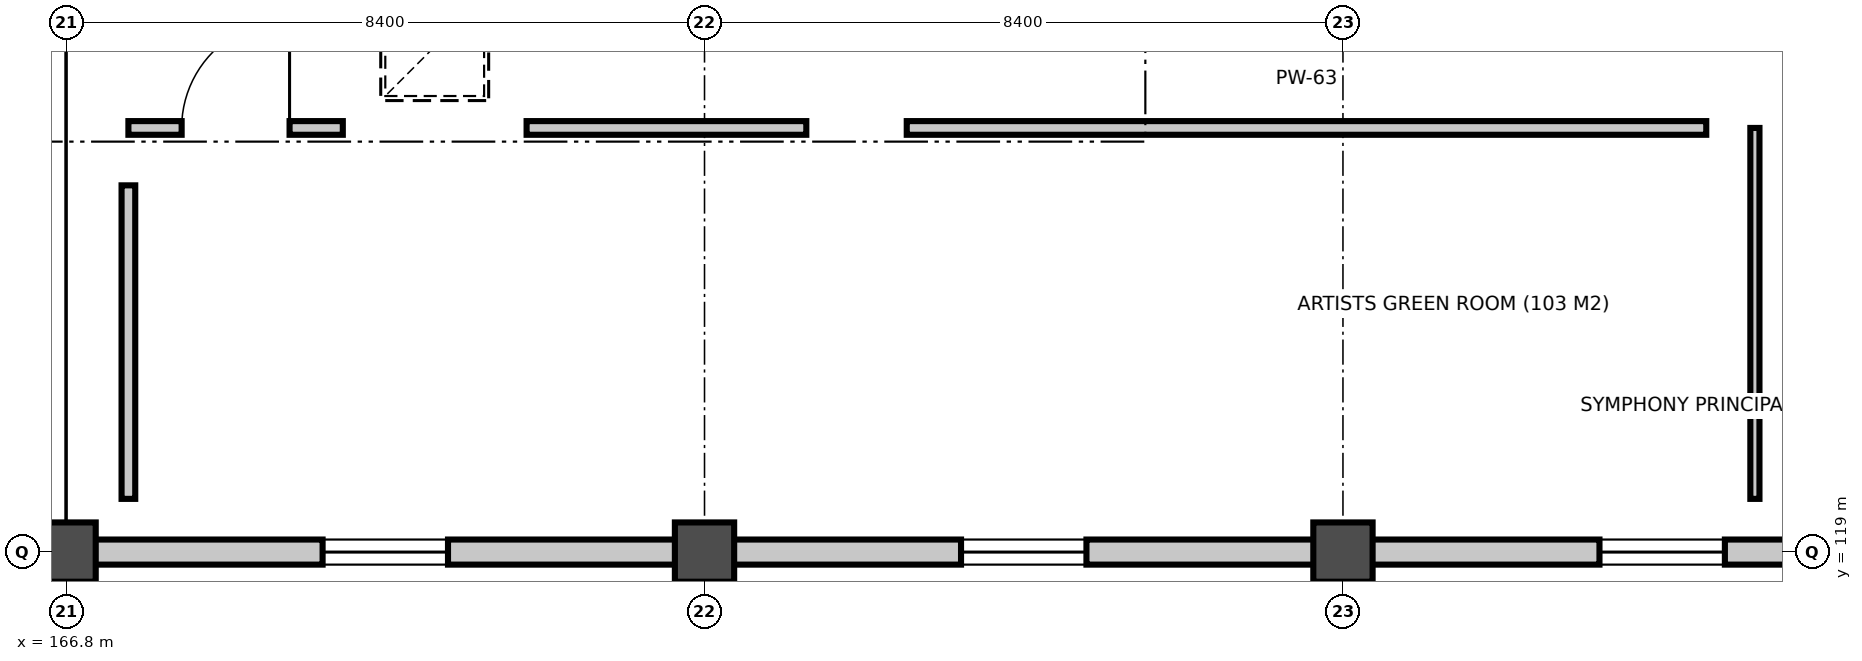
"""IFC4 building model, lengths in metres.
Left out: names, types, materials, properties, quantities, classifications, styles, units other than length and angle.
Written with IfcOpenShell. Run it as: python <this file> out.ifc"""

import sys

from ifc_helpers import new_model, si_unit, direction, frame, frame_2d, origin, origin_2d, place, context, subcontext, project, spatial, rectangle, extrude, element, fill, save


model = new_model("IFC4")
c1 = context("Model", 3, precision=1e-05, world=origin(), true_north=direction((0.0, 1.0)))
c2 = subcontext(c1, "Body", "Model", "MODEL_VIEW")
j1 = project(units=[si_unit("LENGTHUNIT", "METRE"), si_unit("PLANEANGLEUNIT", "RADIAN")], contexts=[c1])
p1 = place(None, origin())
s1 = spatial("IfcSite", under=j1, at=p1, CompositionType="ELEMENT")
p2 = place(p1, origin())
s2 = spatial("IfcBuilding", under=s1, at=p2, CompositionType="ELEMENT")
p3 = place(p2, frame((0.0, 0.0, 5.4)))
s3 = spatial("IfcBuildingStorey", under=s2, at=p3, CompositionType="ELEMENT", Elevation=5.4)
for number, where, z_axis, x_axis in (
    (1, (166.8, 119.0, 0.0), (0.0, 0.0, 1.0), (1.0, 0.0, 0.0)),
    (2, (175.2, 119.0, 0.0), (0.0, 0.0, 1.0), (1.0, 0.0, 0.0)),
    (3, (183.6, 119.0, 0.0), (0.0, 0.0, 1.0), (1.0, 0.0, 0.0)),
):
    element("IfcColumn", number, at=place(p3, frame(where, z_axis=z_axis, x_axis=x_axis)), inside=s3, PredefinedType="COLUMN", context=c2, shape_type="SweptSolid", body=[
        extrude(rectangle(XDim=0.78, YDim=0.78, at=origin_2d()), origin(), (0.0, 0.0, 1.0), 4.8),
    ])
p4 = place(p3, frame((174.83, 119.0, 0.0), z_axis=(0.0, 0.0, 1.0), x_axis=(-1.0, 0.0, 0.0)))
e4 = element("IfcWall", 4, at=p4, inside=s3, PredefinedType="SOLIDWALL", context=c2, shape_type="SweptSolid", body=[
    extrude(rectangle(XDim=7.66, YDim=0.33, at=frame_2d((3.83, 0.0))), origin(), (0.0, 0.0, 1.0), 3.488),
])
p5 = place(p4, frame((3.005, 0.0, 0.95)))
e5 = element("IfcOpeningElement", 5, at=p5, cuts=e4, PredefinedType="OPENING", context=c2, shape_type="SweptSolid", body=[
    extrude(rectangle(XDim=1.65, YDim=2.05, at=frame_2d((0.825, 1.025))), frame((0.0, 0.175, 0.0), z_axis=(0.0, -1.0, 0.0), x_axis=(1.0, 0.0, 0.0)), (0.0, 0.0, 1.0), 0.35),
])
p6 = place(p3, frame((183.23, 119.0, 0.0), z_axis=(0.0, 0.0, 1.0), x_axis=(-1.0, 0.0, 0.0)))
e6 = element("IfcWall", 6, at=p6, inside=s3, PredefinedType="SOLIDWALL", context=c2, shape_type="SweptSolid", body=[
    extrude(rectangle(XDim=7.66, YDim=0.33, at=frame_2d((3.83, 0.0))), origin(), (0.0, 0.0, 1.0), 3.594),
])
p7 = place(p6, frame((3.005, 0.0, 0.95)))
e7 = element("IfcOpeningElement", 7, at=p7, cuts=e6, PredefinedType="OPENING", context=c2, shape_type="SweptSolid", body=[
    extrude(rectangle(XDim=1.65, YDim=2.05, at=frame_2d((0.825, 1.025))), frame((0.0, 0.175, 0.0), z_axis=(0.0, -1.0, 0.0), x_axis=(1.0, 0.0, 0.0)), (0.0, 0.0, 1.0), 0.35),
])
p8 = place(p3, frame((191.63, 119.0, 0.0), z_axis=(0.0, 0.0, 1.0), x_axis=(-1.0, 0.0, 0.0)))
e8 = element("IfcWall", 8, at=p8, inside=s3, PredefinedType="SOLIDWALL", context=c2, shape_type="SweptSolid", body=[
    extrude(rectangle(XDim=7.66, YDim=0.33, at=frame_2d((3.83, 0.0))), origin(), (0.0, 0.0, 1.0), 3.906),
])
p9 = place(p8, frame((3.005, 0.0, 0.95)))
e9 = element("IfcOpeningElement", 9, at=p9, cuts=e8, PredefinedType="OPENING", context=c2, shape_type="SweptSolid", body=[
    extrude(rectangle(XDim=1.65, YDim=2.05, at=frame_2d((0.825, 1.025))), frame((0.0, 0.175, 0.0), z_axis=(0.0, -1.0, 0.0), x_axis=(1.0, 0.0, 0.0)), (0.0, 0.0, 1.0), 0.35),
])
p10 = place(p3, frame((189.02, 119.7, 0.0), z_axis=(0.0, 0.0, 1.0), x_axis=(0.0, 1.0, 0.0)))
e10 = element("IfcWall", 10, at=p10, inside=s3, PredefinedType="PARTITIONING", context=c2, shape_type="SweptSolid", body=[
    extrude(rectangle(XDim=4.88, YDim=0.12, at=frame_2d((2.44, 0.0))), origin(), (0.0, 0.0, 1.0), 3.45),
])
p11 = place(p3, frame((167.62, 124.58, 0.0), z_axis=(0.0, 0.0, 1.0), x_axis=(1.0, 0.0, 0.0)))
e11 = element("IfcWall", 11, at=p11, inside=s3, PredefinedType="PARTITIONING", context=c2, shape_type="SweptSolid", body=[
    extrude(rectangle(XDim=2.821, YDim=0.18, at=frame_2d((1.41, 0.0))), origin(), (0.0, 0.0, 1.0), 3.45),
])
p12 = place(p11, frame((0.7, 0.0, 0.0)))
e12 = element("IfcOpeningElement", 12, at=p12, cuts=e11, PredefinedType="OPENING", context=c2, shape_type="SweptSolid", body=[
    extrude(rectangle(XDim=1.42, YDim=2.34, at=frame_2d((0.71, 1.17))), frame((0.0, 0.1, 0.0), z_axis=(0.0, -1.0, 0.0), x_axis=(1.0, 0.0, 0.0)), (0.0, 0.0, 1.0), 0.2),
])
p13 = place(p3, frame((172.859, 124.58, 0.0), z_axis=(0.0, 0.0, 1.0), x_axis=(1.0, 0.0, 0.0)))
e13 = element("IfcWall", 13, at=p13, inside=s3, PredefinedType="PARTITIONING", context=c2, shape_type="SweptSolid", body=[
    extrude(rectangle(XDim=3.68, YDim=0.18, at=frame_2d((1.84, 0.0))), origin(), (0.0, 0.0, 1.0), 3.45),
])
p14 = place(p3, frame((177.861, 124.58, 0.0), z_axis=(0.0, 0.0, 1.0), x_axis=(1.0, 0.0, 0.0)))
e14 = element("IfcWall", 14, at=p14, inside=s3, PredefinedType="PARTITIONING", context=c2, shape_type="SweptSolid", body=[
    extrude(rectangle(XDim=10.519, YDim=0.18, at=frame_2d((5.26, 0.0))), origin(), (0.0, 0.0, 1.0), 3.45),
])
p15 = place(p3, frame((167.62, 119.7, 0.0), z_axis=(0.0, 0.0, 1.0), x_axis=(0.0, 1.0, 0.0)))
e15 = element("IfcWall", 15, at=p15, inside=s3, PredefinedType="PARTITIONING", context=c2, shape_type="SweptSolid", body=[
    extrude(rectangle(XDim=4.125, YDim=0.18, at=frame_2d((2.062, 0.0))), origin(), (0.0, 0.0, 1.0), 3.45),
])
p16 = place(p5, origin())
e16 = element("IfcWindow", 16, at=p16, inside=s3, PartitioningType="SINGLE_PANEL", PredefinedType="WINDOW", context=c2, shape_type="SweptSolid", body=[
    extrude(rectangle(XDim=1.65, YDim=2.05, at=frame_2d((0.825, 1.025))), frame((0.0, 0.03, 0.0), z_axis=(0.0, -1.0, 0.0), x_axis=(1.0, 0.0, 0.0)), (0.0, 0.0, 1.0), 0.06),
])
fill(e5, e16)
p17 = place(p7, origin())
e17 = element("IfcWindow", 17, at=p17, inside=s3, PartitioningType="SINGLE_PANEL", PredefinedType="WINDOW", context=c2, shape_type="SweptSolid", body=[
    extrude(rectangle(XDim=1.65, YDim=2.05, at=frame_2d((0.825, 1.025))), frame((0.0, 0.03, 0.0), z_axis=(0.0, -1.0, 0.0), x_axis=(1.0, 0.0, 0.0)), (0.0, 0.0, 1.0), 0.06),
])
fill(e7, e17)
p18 = place(p9, origin())
e18 = element("IfcWindow", 18, at=p18, inside=s3, PartitioningType="SINGLE_PANEL", PredefinedType="WINDOW", context=c2, shape_type="SweptSolid", body=[
    extrude(rectangle(XDim=1.65, YDim=2.05, at=frame_2d((0.825, 1.025))), frame((0.0, 0.03, 0.0), z_axis=(0.0, -1.0, 0.0), x_axis=(1.0, 0.0, 0.0)), (0.0, 0.0, 1.0), 0.06),
])
fill(e9, e18)
p19 = place(p12, origin())
e19 = element("IfcDoor", 19, at=p19, inside=s3, OperationType="SINGLE_SWING_RIGHT", PredefinedType="DOOR", context=c2, shape_type="SweptSolid", body=[
    extrude(rectangle(XDim=1.42, YDim=2.34, at=frame_2d((0.71, 1.17))), frame((0.0, 0.025, 0.0), z_axis=(0.0, -1.0, 0.0), x_axis=(1.0, 0.0, 0.0)), (0.0, 0.0, 1.0), 0.05),
])
fill(e12, e19)
save(model, sys.argv[1])
